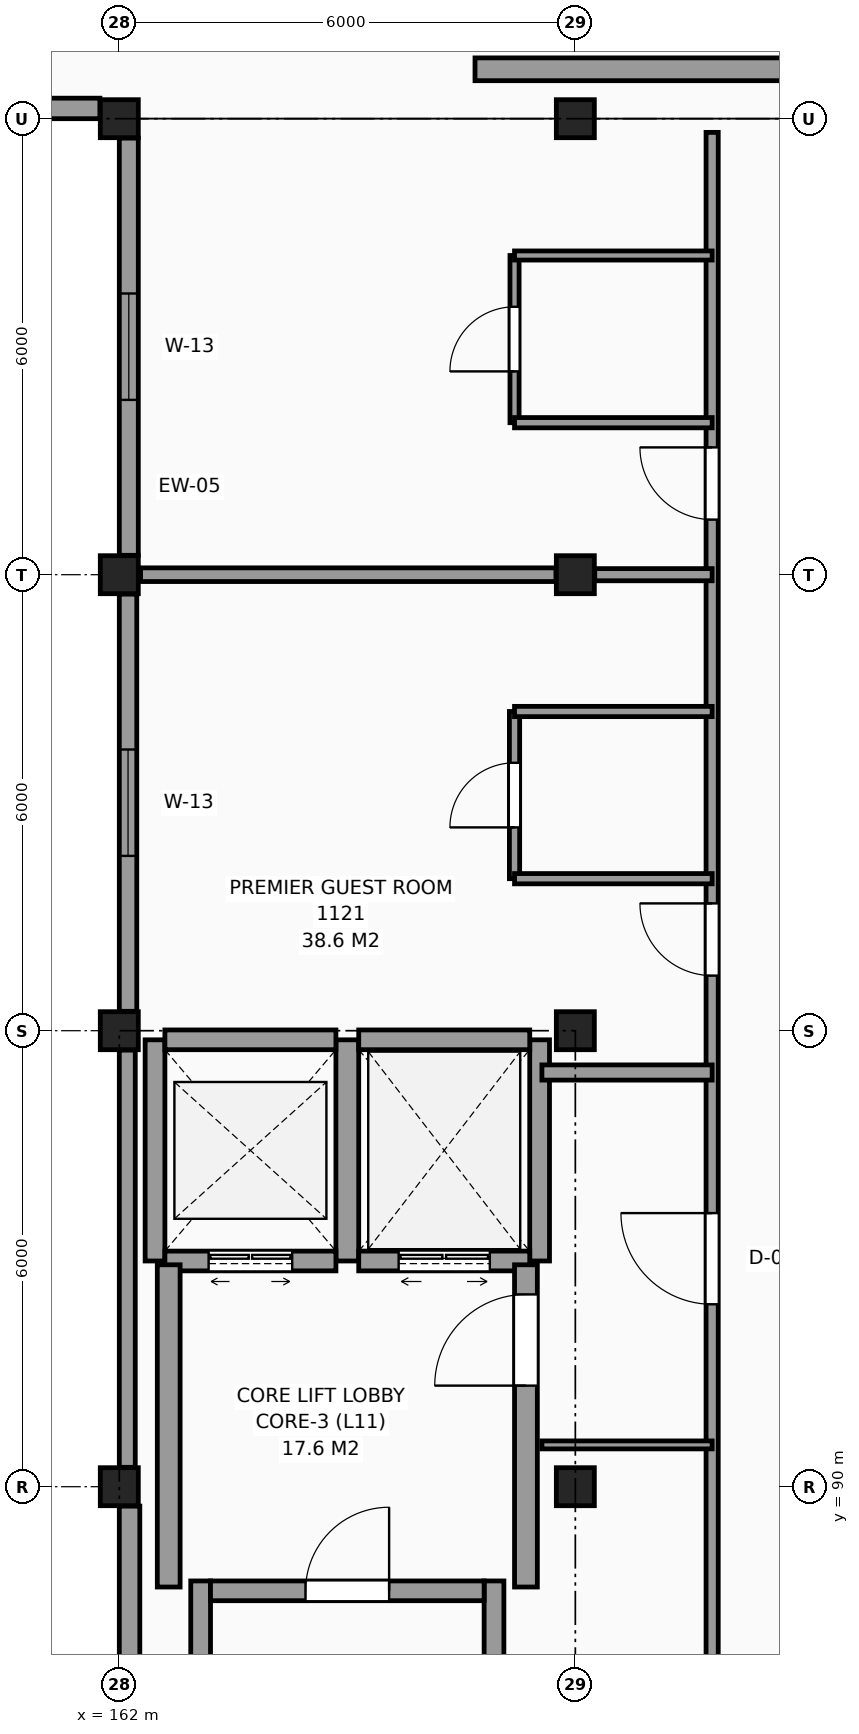
"""IFC4 building model, lengths in metres.
Left out: names, types, materials, properties, quantities, classifications, styles, units other than length and angle.
Written with IfcOpenShell. Run it as: python <this file> out.ifc"""

import sys

from ifc_helpers import new_model, si_unit, direction, frame, frame_2d, origin, origin_2d, place, context, subcontext, project, spatial, rectangle, extrude, element, fill, save


model = new_model("IFC4")
c1 = context("Model", 3, precision=1e-05, world=origin(), true_north=direction((0.0, 1.0)))
c2 = subcontext(c1, "Body", "Model", "MODEL_VIEW")
j1 = project(units=[si_unit("LENGTHUNIT", "METRE"), si_unit("PLANEANGLEUNIT", "RADIAN")], contexts=[c1])
p1 = place(None, origin())
s1 = spatial("IfcSite", under=j1, at=p1, CompositionType="ELEMENT")
p2 = place(p1, origin())
s2 = spatial("IfcBuilding", under=s1, at=p2, CompositionType="ELEMENT")
p3 = place(p2, frame((0.0, 0.0, 44.7)))
s3 = spatial("IfcBuildingStorey", under=s2, at=p3, CompositionType="ELEMENT", Elevation=44.7)
for number, where, z_axis, x_axis in (
    (1, (162.0, 90.0, 0.0), (0.0, 0.0, 1.0), (1.0, 0.0, 0.0)),
    (2, (162.0, 96.0, 0.0), (0.0, 0.0, 1.0), (1.0, 0.0, 0.0)),
    (3, (162.0, 102.0, 0.0), (0.0, 0.0, 1.0), (1.0, 0.0, 0.0)),
    (4, (162.0, 108.0, 0.0), (0.0, 0.0, 1.0), (1.0, 0.0, 0.0)),
    (5, (168.0, 90.0, 0.0), (0.0, 0.0, 1.0), (1.0, 0.0, 0.0)),
    (6, (168.0, 96.0, 0.0), (0.0, 0.0, 1.0), (1.0, 0.0, 0.0)),
    (7, (168.0, 102.0, 0.0), (0.0, 0.0, 1.0), (1.0, 0.0, 0.0)),
    (8, (168.0, 108.0, 0.0), (0.0, 0.0, 1.0), (1.0, 0.0, 0.0)),
):
    element("IfcColumn", number, at=place(p3, frame(where, z_axis=z_axis, x_axis=x_axis)), inside=s3, PredefinedType="COLUMN", context=c2, shape_type="SweptSolid", body=[
        extrude(rectangle(XDim=0.5, YDim=0.5, at=origin_2d()), origin(), (0.0, 0.0, 1.0), 3.3),
    ])
p4 = place(p3, frame((156.255, 108.135, 0.0), z_axis=(0.0, 0.0, 1.0), x_axis=(1.0, 0.0, 0.0)))
e9 = element("IfcWall", 9, at=p4, inside=s3, PredefinedType="SOLIDWALL", context=c2, shape_type="SweptSolid", body=[
    extrude(rectangle(XDim=5.49, YDim=0.27, at=frame_2d((2.745, 0.0))), origin(), (0.0, 0.0, 1.0), 3.05),
])
p5 = place(p3, frame((162.125, 107.745, 0.0), z_axis=(0.0, 0.0, 1.0), x_axis=(0.0, -1.0, 0.0)))
e10 = element("IfcWall", 10, at=p5, inside=s3, PredefinedType="SOLIDWALL", context=c2, shape_type="SweptSolid", body=[
    extrude(rectangle(XDim=5.49, YDim=0.25, at=frame_2d((2.745, 0.0))), origin(), (0.0, 0.0, 1.0), 2.4),
])
p6 = place(p5, frame((2.045, 0.0, 0.8)))
e11 = element("IfcOpeningElement", 11, at=p6, cuts=e10, PredefinedType="OPENING", context=c2, shape_type="SweptSolid", body=[
    extrude(rectangle(XDim=1.4, YDim=1.4, at=frame_2d((0.7, 0.7))), frame((0.0, 0.135, 0.0), z_axis=(0.0, -1.0, 0.0), x_axis=(1.0, 0.0, 0.0)), (0.0, 0.0, 1.0), 0.27),
])
p7 = place(p3, frame((162.115, 101.745, 0.0), z_axis=(0.0, 0.0, 1.0), x_axis=(0.0, -1.0, 0.0)))
e12 = element("IfcWall", 12, at=p7, inside=s3, PredefinedType="SOLIDWALL", context=c2, shape_type="SweptSolid", body=[
    extrude(rectangle(XDim=5.49, YDim=0.23, at=frame_2d((2.745, 0.0))), origin(), (0.0, 0.0, 1.0), 2.4),
])
p8 = place(p7, frame((2.045, 0.0, 0.8)))
e13 = element("IfcOpeningElement", 13, at=p8, cuts=e12, PredefinedType="OPENING", context=c2, shape_type="SweptSolid", body=[
    extrude(rectangle(XDim=1.4, YDim=1.4, at=frame_2d((0.7, 0.7))), frame((0.0, 0.125, 0.0), z_axis=(0.0, -1.0, 0.0), x_axis=(1.0, 0.0, 0.0)), (0.0, 0.0, 1.0), 0.25),
])
p9 = place(p3, frame((162.105, 95.745, 0.0), z_axis=(0.0, 0.0, 1.0), x_axis=(0.0, -1.0, 0.0)))
e14 = element("IfcWall", 14, at=p9, inside=s3, PredefinedType="SOLIDWALL", context=c2, shape_type="SweptSolid", body=[
    extrude(rectangle(XDim=5.49, YDim=0.21, at=frame_2d((2.745, 0.0))), origin(), (0.0, 0.0, 1.0), 2.4),
])
p10 = place(p3, frame((162.135, 89.745, 0.0), z_axis=(0.0, 0.0, 1.0), x_axis=(0.0, -1.0, 0.0)))
e15 = element("IfcWall", 15, at=p10, inside=s3, PredefinedType="SOLIDWALL", context=c2, shape_type="SweptSolid", body=[
    extrude(rectangle(XDim=5.49, YDim=0.27, at=frame_2d((2.745, 0.0))), origin(), (0.0, 0.0, 1.0), 2.4),
])
p11 = place(p3, frame((166.68, 108.65, 0.0), z_axis=(0.0, 0.0, 1.0), x_axis=(1.0, 0.0, 0.0)))
e16 = element("IfcWall", 16, at=p11, inside=s3, PredefinedType="SHEAR", context=c2, shape_type="SweptSolid", body=[
    extrude(rectangle(XDim=4.24, YDim=0.3, at=frame_2d((2.12, 0.0))), origin(), (0.0, 0.0, 1.0), 3.3),
])
for number, where, z_axis, x_axis in (
    (17, (163.07, 78.04, 0.0), (0.0, 0.0, 1.0), (0.0, 1.0, 0.0)),
    (18, (166.93, 78.04, 0.0), (0.0, 0.0, 1.0), (0.0, 1.0, 0.0)),
):
    element("IfcWall", number, at=place(p3, frame(where, z_axis=z_axis, x_axis=x_axis)), inside=s3, PredefinedType="SHEAR", context=c2, shape_type="SweptSolid", body=[
        extrude(rectangle(XDim=10.72, YDim=0.26, at=frame_2d((5.36, 0.0))), origin(), (0.0, 0.0, 1.0), 3.3),
    ])
p12 = place(p3, frame((163.2, 88.63, 0.0), z_axis=(0.0, 0.0, 1.0), x_axis=(1.0, 0.0, 0.0)))
e19 = element("IfcWall", 19, at=p12, inside=s3, PredefinedType="SHEAR", context=c2, shape_type="SweptSolid", body=[
    extrude(rectangle(XDim=3.6, YDim=0.26, at=frame_2d((1.8, 0.0))), origin(), (0.0, 0.0, 1.0), 3.3),
])
p13 = place(p12, frame((1.25, 0.0, 0.0)))
e20 = element("IfcOpeningElement", 20, at=p13, cuts=e19, PredefinedType="OPENING", context=c2, shape_type="SweptSolid", body=[
    extrude(rectangle(XDim=1.1, YDim=2.15, at=frame_2d((0.55, 1.075))), frame((0.0, 0.14, 0.0), z_axis=(0.0, -1.0, 0.0), x_axis=(1.0, 0.0, 0.0)), (0.0, 0.0, 1.0), 0.28),
])
p14 = place(p3, frame((162.47, 92.97, 0.0), z_axis=(0.0, 0.0, 1.0), x_axis=(0.0, 1.0, 0.0)))
e21 = element("IfcWall", 21, at=p14, inside=s3, PredefinedType="SHEAR", context=c2, shape_type="SweptSolid", body=[
    extrude(rectangle(XDim=2.91, YDim=0.26, at=frame_2d((1.455, 0.0))), origin(), (0.0, 0.0, 1.0), 3.3),
])
p15 = place(p3, frame((165.0, 92.97, 0.0), z_axis=(0.0, 0.0, 1.0), x_axis=(0.0, 1.0, 0.0)))
e22 = element("IfcWall", 22, at=p15, inside=s3, PredefinedType="SHEAR", context=c2, shape_type="SweptSolid", body=[
    extrude(rectangle(XDim=2.91, YDim=0.3, at=frame_2d((1.455, 0.0))), origin(), (0.0, 0.0, 1.0), 3.3),
])
p16 = place(p3, frame((162.6, 95.88, 0.0), z_axis=(0.0, 0.0, 1.0), x_axis=(1.0, 0.0, 0.0)))
e23 = element("IfcWall", 23, at=p16, inside=s3, PredefinedType="SHEAR", context=c2, shape_type="SweptSolid", body=[
    extrude(rectangle(XDim=2.25, YDim=0.26, at=frame_2d((1.125, 0.0))), origin(), (0.0, 0.0, 1.0), 3.3),
])
p17 = place(p3, frame((162.6, 92.97, 0.0), z_axis=(0.0, 0.0, 1.0), x_axis=(1.0, 0.0, 0.0)))
e24 = element("IfcWall", 24, at=p17, inside=s3, PredefinedType="SHEAR", context=c2, shape_type="SweptSolid", body=[
    extrude(rectangle(XDim=2.25, YDim=0.26, at=frame_2d((1.125, 0.0))), origin(), (0.0, 0.0, 1.0), 3.3),
])
p18 = place(p17, frame((0.575, 0.0, 0.0)))
e25 = element("IfcOpeningElement", 25, at=p18, cuts=e24, PredefinedType="OPENING", context=c2, shape_type="SweptSolid", body=[
    extrude(rectangle(XDim=1.1, YDim=2.2, at=frame_2d((0.55, 1.1))), frame((0.0, 0.14, 0.0), z_axis=(0.0, -1.0, 0.0), x_axis=(1.0, 0.0, 0.0)), (0.0, 0.0, 1.0), 0.28),
])
p19 = place(p3, frame((167.53, 92.97, 0.0), z_axis=(0.0, 0.0, 1.0), x_axis=(0.0, 1.0, 0.0)))
e26 = element("IfcWall", 26, at=p19, inside=s3, PredefinedType="SHEAR", context=c2, shape_type="SweptSolid", body=[
    extrude(rectangle(XDim=2.91, YDim=0.26, at=frame_2d((1.455, 0.0))), origin(), (0.0, 0.0, 1.0), 3.3),
])
p20 = place(p3, frame((165.15, 95.88, 0.0), z_axis=(0.0, 0.0, 1.0), x_axis=(1.0, 0.0, 0.0)))
e27 = element("IfcWall", 27, at=p20, inside=s3, PredefinedType="SHEAR", context=c2, shape_type="SweptSolid", body=[
    extrude(rectangle(XDim=2.25, YDim=0.26, at=frame_2d((1.125, 0.0))), origin(), (0.0, 0.0, 1.0), 3.3),
])
p21 = place(p3, frame((165.15, 92.97, 0.0), z_axis=(0.0, 0.0, 1.0), x_axis=(1.0, 0.0, 0.0)))
e28 = element("IfcWall", 28, at=p21, inside=s3, PredefinedType="SHEAR", context=c2, shape_type="SweptSolid", body=[
    extrude(rectangle(XDim=2.25, YDim=0.26, at=frame_2d((1.125, 0.0))), origin(), (0.0, 0.0, 1.0), 3.3),
])
p22 = place(p21, frame((0.525, 0.0, 0.0)))
e29 = element("IfcOpeningElement", 29, at=p22, cuts=e28, PredefinedType="OPENING", context=c2, shape_type="SweptSolid", body=[
    extrude(rectangle(XDim=1.2, YDim=2.25, at=frame_2d((0.6, 1.125))), frame((0.0, 0.14, 0.0), z_axis=(0.0, -1.0, 0.0), x_axis=(1.0, 0.0, 0.0)), (0.0, 0.0, 1.0), 0.28),
])
p23 = place(p3, frame((167.35, 88.68, 0.0), z_axis=(0.0, 0.0, 1.0), x_axis=(0.0, 1.0, 0.0)))
e30 = element("IfcWall", 30, at=p23, inside=s3, PredefinedType="SHEAR", context=c2, shape_type="SweptSolid", body=[
    extrude(rectangle(XDim=4.24, YDim=0.3, at=frame_2d((2.12, 0.0))), origin(), (0.0, 0.0, 1.0), 3.3),
])
p24 = place(p23, frame((2.65, 0.0, 0.0)))
e31 = element("IfcOpeningElement", 31, at=p24, cuts=e30, PredefinedType="OPENING", context=c2, shape_type="SweptSolid", body=[
    extrude(rectangle(XDim=1.2, YDim=2.2, at=frame_2d((0.6, 1.1))), frame((0.0, 0.16, 0.0), z_axis=(0.0, -1.0, 0.0), x_axis=(1.0, 0.0, 0.0)), (0.0, 0.0, 1.0), 0.32),
])
p25 = place(p3, frame((162.65, 88.68, 0.0), z_axis=(0.0, 0.0, 1.0), x_axis=(0.0, 1.0, 0.0)))
e32 = element("IfcWall", 32, at=p25, inside=s3, PredefinedType="SHEAR", context=c2, shape_type="SweptSolid", body=[
    extrude(rectangle(XDim=4.24, YDim=0.3, at=frame_2d((2.12, 0.0))), origin(), (0.0, 0.0, 1.0), 3.3),
])
p26 = place(p3, frame((167.2, 98.0, 0.0), z_axis=(0.0, 0.0, 1.0), x_axis=(0.0, 1.0, 0.0)))
e33 = element("IfcWall", 33, at=p26, inside=s3, PredefinedType="PARTITIONING", context=c2, shape_type="SweptSolid", body=[
    extrude(rectangle(XDim=2.2, YDim=0.135, at=frame_2d((1.1, 0.0))), origin(), (0.0, 0.0, 1.0), 3.05),
])
p27 = place(p26, frame((0.675, 0.0, 0.0)))
e34 = element("IfcOpeningElement", 34, at=p27, cuts=e33, PredefinedType="OPENING", context=c2, shape_type="SweptSolid", body=[
    extrude(rectangle(XDim=0.85, YDim=2.1, at=frame_2d((0.425, 1.05))), frame((0.0, 0.078, 0.0), z_axis=(0.0, -1.0, 0.0), x_axis=(1.0, 0.0, 0.0)), (0.0, 0.0, 1.0), 0.155),
])
p28 = place(p3, frame((167.2, 104.0, 0.0), z_axis=(0.0, 0.0, 1.0), x_axis=(0.0, 1.0, 0.0)))
e35 = element("IfcWall", 35, at=p28, inside=s3, PredefinedType="PARTITIONING", context=c2, shape_type="SweptSolid", body=[
    extrude(rectangle(XDim=2.2, YDim=0.12, at=frame_2d((1.1, 0.0))), origin(), (0.0, 0.0, 1.0), 3.05),
])
p29 = place(p28, frame((0.675, 0.0, 0.0)))
e36 = element("IfcOpeningElement", 36, at=p29, cuts=e35, PredefinedType="OPENING", context=c2, shape_type="SweptSolid", body=[
    extrude(rectangle(XDim=0.85, YDim=2.1, at=frame_2d((0.425, 1.05))), frame((0.0, 0.07, 0.0), z_axis=(0.0, -1.0, 0.0), x_axis=(1.0, 0.0, 0.0)), (0.0, 0.0, 1.0), 0.14),
])
p30 = place(p3, frame((169.8, 66.255, 0.0), z_axis=(0.0, 0.0, 1.0), x_axis=(0.0, 1.0, 0.0)))
e37 = element("IfcWall", 37, at=p30, inside=s3, PredefinedType="PARTITIONING", context=c2, shape_type="SweptSolid", body=[
    extrude(rectangle(XDim=41.565, YDim=0.16, at=frame_2d((20.783, 0.0))), origin(), (0.0, 0.0, 1.0), 3.05),
])
p31 = place(p30, frame((26.145, 0.0, 0.0)))
e38 = element("IfcOpeningElement", 38, at=p31, cuts=e37, PredefinedType="OPENING", context=c2, shape_type="SweptSolid", body=[
    extrude(rectangle(XDim=1.2, YDim=2.2, at=frame_2d((0.6, 1.1))), frame((0.0, 0.09, 0.0), z_axis=(0.0, -1.0, 0.0), x_axis=(1.0, 0.0, 0.0)), (0.0, 0.0, 1.0), 0.18),
])
p32 = place(p30, frame((8.245, 0.0, 0.0)))
e39 = element("IfcOpeningElement", 39, at=p32, cuts=e37, PredefinedType="OPENING", context=c2, shape_type="SweptSolid", body=[
    extrude(rectangle(XDim=1.0, YDim=2.15, at=frame_2d((0.5, 1.075))), frame((0.0, 0.09, 0.0), z_axis=(0.0, -1.0, 0.0), x_axis=(1.0, 0.0, 0.0)), (0.0, 0.0, 1.0), 0.18),
])
p33 = place(p30, frame((0.42, 0.0, 0.0)))
e40 = element("IfcOpeningElement", 40, at=p33, cuts=e37, PredefinedType="OPENING", context=c2, shape_type="SweptSolid", body=[
    extrude(rectangle(XDim=0.95, YDim=2.1, at=frame_2d((0.475, 1.05))), frame((0.0, 0.09, 0.0), z_axis=(0.0, -1.0, 0.0), x_axis=(1.0, 0.0, 0.0)), (0.0, 0.0, 1.0), 0.18),
])
p34 = place(p30, frame((30.47, 0.0, 0.0)))
e41 = element("IfcOpeningElement", 41, at=p34, cuts=e37, PredefinedType="OPENING", context=c2, shape_type="SweptSolid", body=[
    extrude(rectangle(XDim=0.95, YDim=2.1, at=frame_2d((0.475, 1.05))), frame((0.0, 0.09, 0.0), z_axis=(0.0, -1.0, 0.0), x_axis=(1.0, 0.0, 0.0)), (0.0, 0.0, 1.0), 0.18),
])
p35 = place(p30, frame((36.47, 0.0, 0.0)))
e42 = element("IfcOpeningElement", 42, at=p35, cuts=e37, PredefinedType="OPENING", context=c2, shape_type="SweptSolid", body=[
    extrude(rectangle(XDim=0.95, YDim=2.1, at=frame_2d((0.475, 1.05))), frame((0.0, 0.09, 0.0), z_axis=(0.0, -1.0, 0.0), x_axis=(1.0, 0.0, 0.0)), (0.0, 0.0, 1.0), 0.18),
])
p36 = place(p3, frame((167.56, 90.55, 0.0), z_axis=(0.0, 0.0, 1.0), x_axis=(1.0, 0.0, 0.0)))
e43 = element("IfcWall", 43, at=p36, inside=s3, PredefinedType="PARTITIONING", context=c2, shape_type="SweptSolid", body=[
    extrude(rectangle(XDim=2.24, YDim=0.105, at=frame_2d((1.12, 0.0))), origin(), (0.0, 0.0, 1.0), 3.05),
])
p37 = place(p3, frame((167.56, 95.45, 0.0), z_axis=(0.0, 0.0, 1.0), x_axis=(1.0, 0.0, 0.0)))
e44 = element("IfcWall", 44, at=p37, inside=s3, PredefinedType="PARTITIONING", context=c2, shape_type="SweptSolid", body=[
    extrude(rectangle(XDim=2.24, YDim=0.2, at=frame_2d((1.12, 0.0))), origin(), (0.0, 0.0, 1.0), 3.05),
])
for number, where, z_axis, x_axis in (
    (45, (167.2, 98.0, 0.0), (0.0, 0.0, 1.0), (1.0, 0.0, 0.0)),
    (46, (167.2, 100.2, 0.0), (0.0, 0.0, 1.0), (1.0, 0.0, 0.0)),
):
    element("IfcWall", number, at=place(p3, frame(where, z_axis=z_axis, x_axis=x_axis)), inside=s3, PredefinedType="PARTITIONING", context=c2, shape_type="SweptSolid", body=[
        extrude(rectangle(XDim=2.6, YDim=0.135, at=frame_2d((1.3, 0.0))), origin(), (0.0, 0.0, 1.0), 3.05),
    ])
p38 = place(p3, frame((162.28, 102.0, 0.0), z_axis=(0.0, 0.0, 1.0), x_axis=(1.0, 0.0, 0.0)))
e47 = element("IfcWall", 47, at=p38, inside=s3, PredefinedType="PARTITIONING", context=c2, shape_type="SweptSolid", body=[
    extrude(rectangle(XDim=5.465, YDim=0.18, at=frame_2d((2.732, 0.0))), origin(), (0.0, 0.0, 1.0), 2.76),
])
p39 = place(p3, frame((168.255, 102.0, 0.0), z_axis=(0.0, 0.0, 1.0), x_axis=(1.0, 0.0, 0.0)))
e48 = element("IfcWall", 48, at=p39, inside=s3, PredefinedType="PARTITIONING", context=c2, shape_type="SweptSolid", body=[
    extrude(rectangle(XDim=1.545, YDim=0.16, at=frame_2d((0.772, 0.0))), origin(), (0.0, 0.0, 1.0), 2.25),
])
p40 = place(p3, frame((167.2, 104.0, 0.0), z_axis=(0.0, 0.0, 1.0), x_axis=(1.0, 0.0, 0.0)))
e49 = element("IfcWall", 49, at=p40, inside=s3, PredefinedType="PARTITIONING", context=c2, shape_type="SweptSolid", body=[
    extrude(rectangle(XDim=2.6, YDim=0.135, at=frame_2d((1.3, 0.0))), origin(), (0.0, 0.0, 1.0), 3.05),
])
p41 = place(p3, frame((167.2, 106.2, 0.0), z_axis=(0.0, 0.0, 1.0), x_axis=(1.0, 0.0, 0.0)))
e50 = element("IfcWall", 50, at=p41, inside=s3, PredefinedType="PARTITIONING", context=c2, shape_type="SweptSolid", body=[
    extrude(rectangle(XDim=2.6, YDim=0.12, at=frame_2d((1.3, 0.0))), origin(), (0.0, 0.0, 1.0), 3.05),
])
p42 = place(p8, origin())
e51 = element("IfcWindow", 51, at=p42, inside=s3, PartitioningType="SINGLE_PANEL", PredefinedType="WINDOW", context=c2, shape_type="SweptSolid", body=[
    extrude(rectangle(XDim=1.4, YDim=1.4, at=frame_2d((0.7, 0.7))), frame((0.0, 0.03, 0.0), z_axis=(0.0, -1.0, 0.0), x_axis=(1.0, 0.0, 0.0)), (0.0, 0.0, 1.0), 0.06),
])
fill(e13, e51)
p43 = place(p6, origin())
e52 = element("IfcWindow", 52, at=p43, inside=s3, PartitioningType="SINGLE_PANEL", PredefinedType="WINDOW", context=c2, shape_type="SweptSolid", body=[
    extrude(rectangle(XDim=1.4, YDim=1.4, at=frame_2d((0.7, 0.7))), frame((0.0, 0.03, 0.0), z_axis=(0.0, -1.0, 0.0), x_axis=(1.0, 0.0, 0.0)), (0.0, 0.0, 1.0), 0.06),
])
fill(e11, e52)
p44 = place(p13, origin())
e53 = element("IfcDoor", 53, at=p44, inside=s3, OperationType="SINGLE_SWING_RIGHT", PredefinedType="DOOR", context=c2, shape_type="SweptSolid", body=[
    extrude(rectangle(XDim=1.1, YDim=2.15, at=frame_2d((0.55, 1.075))), frame((0.0, 0.025, 0.0), z_axis=(0.0, -1.0, 0.0), x_axis=(1.0, 0.0, 0.0)), (0.0, 0.0, 1.0), 0.05),
])
fill(e20, e53)
p45 = place(p18, origin())
e54 = element("IfcDoor", 54, at=p45, inside=s3, OperationType="DOUBLE_DOOR_SLIDING", PredefinedType="DOOR", context=c2, shape_type="SweptSolid", body=[
    extrude(rectangle(XDim=1.1, YDim=2.2, at=frame_2d((0.55, 1.1))), frame((0.0, 0.025, 0.0), z_axis=(0.0, -1.0, 0.0), x_axis=(1.0, 0.0, 0.0)), (0.0, 0.0, 1.0), 0.05),
])
fill(e25, e54)
p46 = place(p22, origin())
e55 = element("IfcDoor", 55, at=p46, inside=s3, OperationType="DOUBLE_DOOR_SLIDING", PredefinedType="DOOR", context=c2, shape_type="SweptSolid", body=[
    extrude(rectangle(XDim=1.2, YDim=2.25, at=frame_2d((0.6, 1.125))), frame((0.0, 0.025, 0.0), z_axis=(0.0, -1.0, 0.0), x_axis=(1.0, 0.0, 0.0)), (0.0, 0.0, 1.0), 0.05),
])
fill(e29, e55)
p47 = place(p24, origin())
e56 = element("IfcDoor", 56, at=p47, inside=s3, OperationType="SINGLE_SWING_LEFT", PredefinedType="DOOR", context=c2, shape_type="SweptSolid", body=[
    extrude(rectangle(XDim=1.2, YDim=2.2, at=frame_2d((0.6, 1.1))), frame((0.0, 0.025, 0.0), z_axis=(0.0, -1.0, 0.0), x_axis=(1.0, 0.0, 0.0)), (0.0, 0.0, 1.0), 0.05),
])
fill(e31, e56)
p48 = place(p31, origin())
e57 = element("IfcDoor", 57, at=p48, inside=s3, OperationType="SINGLE_SWING_RIGHT", PredefinedType="DOOR", context=c2, shape_type="SweptSolid", body=[
    extrude(rectangle(XDim=1.2, YDim=2.2, at=frame_2d((0.6, 1.1))), frame((0.0, 0.025, 0.0), z_axis=(0.0, -1.0, 0.0), x_axis=(1.0, 0.0, 0.0)), (0.0, 0.0, 1.0), 0.05),
])
fill(e38, e57)
p49 = place(p27, origin())
e58 = element("IfcDoor", 58, at=p49, inside=s3, OperationType="SINGLE_SWING_LEFT", PredefinedType="DOOR", context=c2, shape_type="SweptSolid", body=[
    extrude(rectangle(XDim=0.85, YDim=2.1, at=frame_2d((0.425, 1.05))), frame((0.0, 0.025, 0.0), z_axis=(0.0, -1.0, 0.0), x_axis=(1.0, 0.0, 0.0)), (0.0, 0.0, 1.0), 0.05),
])
fill(e34, e58)
p50 = place(p34, origin())
e59 = element("IfcDoor", 59, at=p50, inside=s3, OperationType="SINGLE_SWING_RIGHT", PredefinedType="DOOR", context=c2, shape_type="SweptSolid", body=[
    extrude(rectangle(XDim=0.95, YDim=2.1, at=frame_2d((0.475, 1.05))), frame((0.0, 0.025, 0.0), z_axis=(0.0, -1.0, 0.0), x_axis=(1.0, 0.0, 0.0)), (0.0, 0.0, 1.0), 0.05),
])
fill(e41, e59)
p51 = place(p29, origin())
e60 = element("IfcDoor", 60, at=p51, inside=s3, OperationType="SINGLE_SWING_LEFT", PredefinedType="DOOR", context=c2, shape_type="SweptSolid", body=[
    extrude(rectangle(XDim=0.85, YDim=2.1, at=frame_2d((0.425, 1.05))), frame((0.0, 0.025, 0.0), z_axis=(0.0, -1.0, 0.0), x_axis=(1.0, 0.0, 0.0)), (0.0, 0.0, 1.0), 0.05),
])
fill(e36, e60)
p52 = place(p35, origin())
e61 = element("IfcDoor", 61, at=p52, inside=s3, OperationType="SINGLE_SWING_RIGHT", PredefinedType="DOOR", context=c2, shape_type="SweptSolid", body=[
    extrude(rectangle(XDim=0.95, YDim=2.1, at=frame_2d((0.475, 1.05))), frame((0.0, 0.025, 0.0), z_axis=(0.0, -1.0, 0.0), x_axis=(1.0, 0.0, 0.0)), (0.0, 0.0, 1.0), 0.05),
])
fill(e42, e61)
save(model, sys.argv[1])
